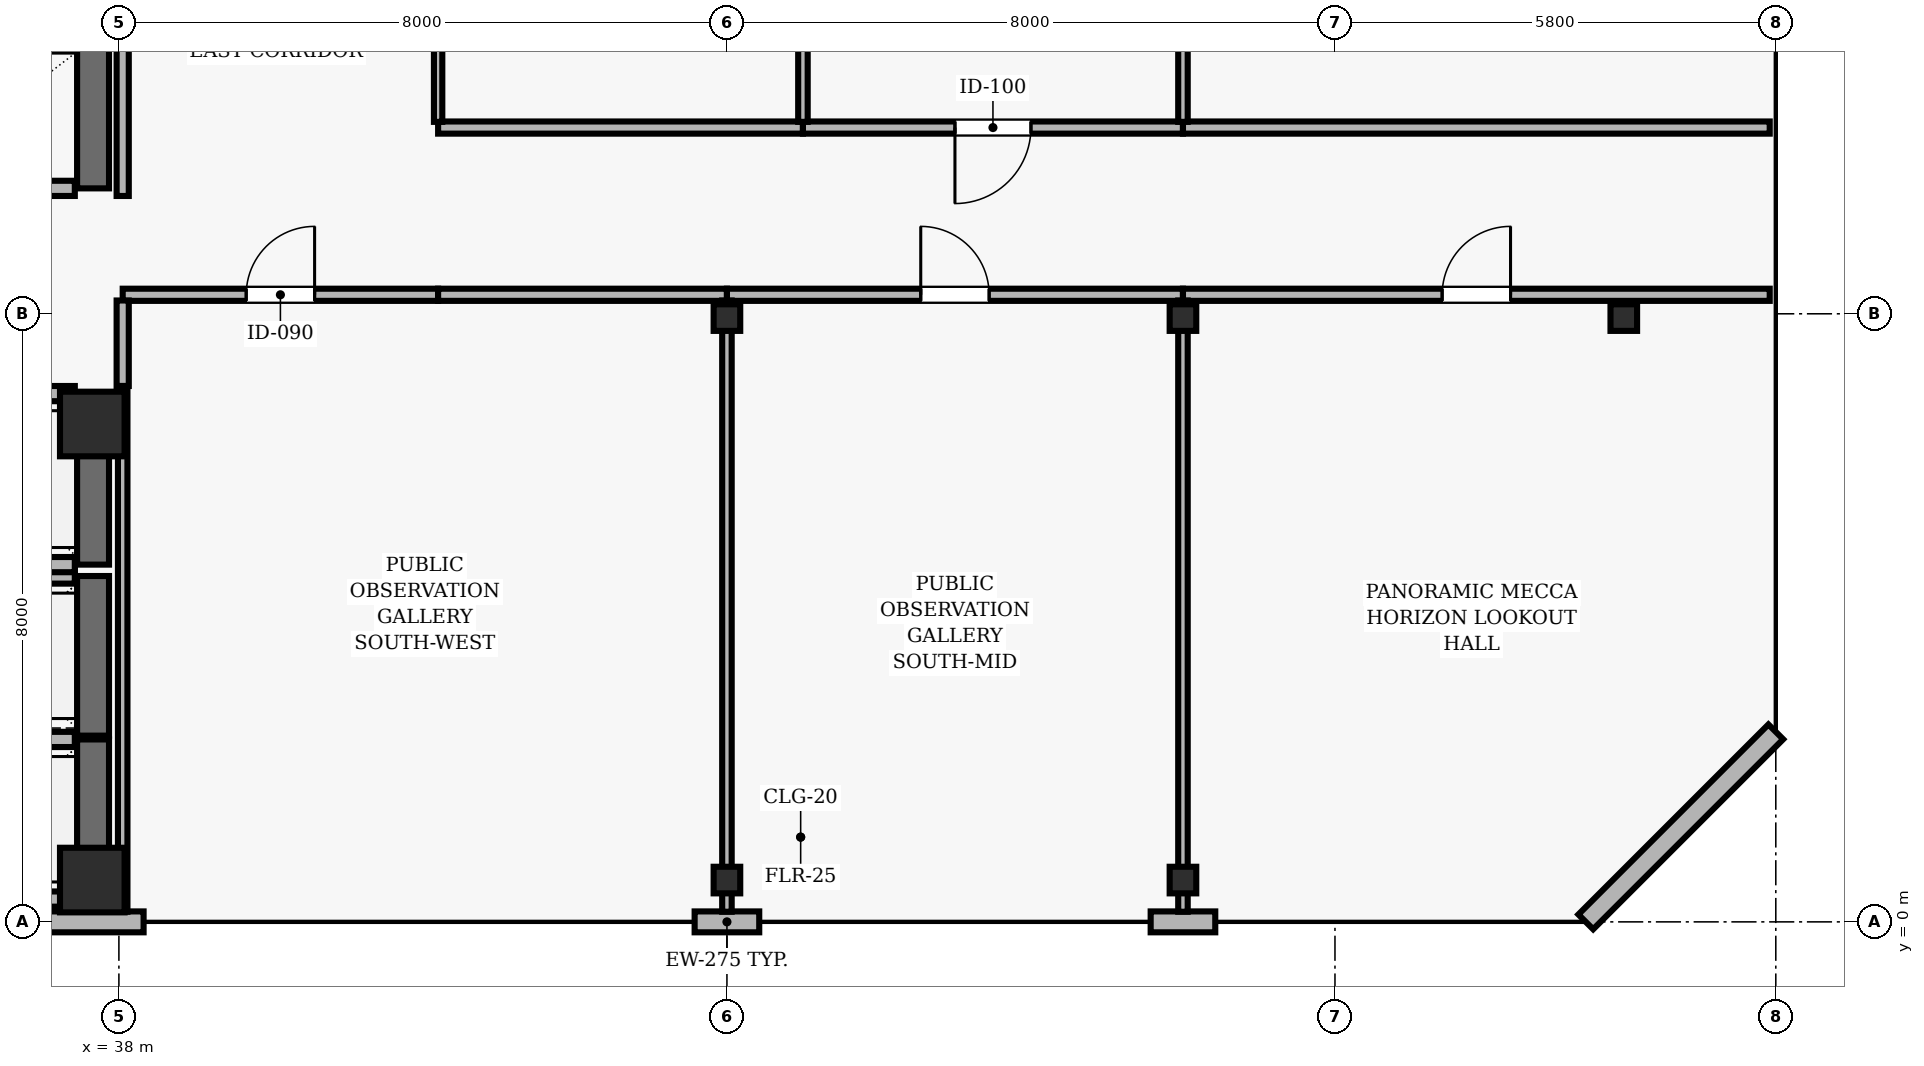
"""IFC4 building model, lengths in metres.
Left out: names, types, materials, properties, quantities, classifications, styles, units other than length and angle.
Written with IfcOpenShell. Run it as: python <this file> out.ifc"""

import sys

from ifc_helpers import new_model, si_unit, direction, frame, frame_2d, origin, origin_2d, place, context, subcontext, project, spatial, rectangle, hollow_rectangle, extrude, element, fill, save


model = new_model("IFC4")
c1 = context("Model", 3, precision=1e-05, world=origin(), true_north=direction((0.0, 1.0)))
c2 = subcontext(c1, "Body", "Model", "MODEL_VIEW")
j1 = project(units=[si_unit("LENGTHUNIT", "METRE"), si_unit("PLANEANGLEUNIT", "RADIAN")], contexts=[c1])
p1 = place(None, origin())
s1 = spatial("IfcSite", under=j1, at=p1, CompositionType="ELEMENT")
p2 = place(p1, origin())
s2 = spatial("IfcBuilding", under=s1, at=p2, CompositionType="ELEMENT")
p3 = place(p2, frame((0.0, 0.0, 306.7)))
s3 = spatial("IfcBuildingStorey", under=s2, at=p3, CompositionType="ELEMENT", Elevation=306.7)
for number, where, z_axis, x_axis in (
    (1, (37.65, 0.55, 0.0), (0.0, 0.0, 1.0), (1.0, 0.0, 0.0)),
    (2, (37.65, 6.55, 0.0), (0.0, 0.0, 1.0), (1.0, 0.0, 0.0)),
):
    element("IfcColumn", number, at=place(p3, frame(where, z_axis=z_axis, x_axis=x_axis)), inside=s3, PredefinedType="COLUMN", context=c2, shape_type="SweptSolid", body=[
        extrude(rectangle(XDim=0.85, YDim=0.85, at=origin_2d()), origin(), (0.0, 0.0, 1.0), 5.0),
    ])
for number, where, z_axis, x_axis in (
    (3, (46.0, 0.55, 0.0), (0.0, 0.0, 1.0), (1.0, 0.0, 0.0)),
    (4, (46.0, 7.95, 0.0), (0.0, 0.0, 1.0), (1.0, 0.0, 0.0)),
    (5, (52.0, 0.55, 0.0), (0.0, 0.0, 1.0), (1.0, 0.0, 0.0)),
    (6, (52.0, 7.95, 0.0), (0.0, 0.0, 1.0), (1.0, 0.0, 0.0)),
    (7, (57.8, 7.95, 0.0), (0.0, 0.0, 1.0), (1.0, 0.0, 0.0)),
):
    element("IfcColumn", number, at=place(p3, frame(where, z_axis=z_axis, x_axis=x_axis)), inside=s3, PredefinedType="COLUMN", context=c2, shape_type="SweptSolid", body=[
        extrude(hollow_rectangle(XDim=0.35, YDim=0.35, WallThickness=0.016, at=origin_2d()), origin(), (0.0, 0.0, 1.0), 5.0),
    ])
p4 = place(p3, frame((36.975, 0.0, 0.0), z_axis=(0.0, 0.0, 1.0), x_axis=(1.0, 0.0, 0.0)))
e8 = element("IfcWall", 8, at=p4, inside=s3, PredefinedType="SOLIDWALL", context=c2, shape_type="SweptSolid", body=[
    extrude(rectangle(XDim=1.35, YDim=0.275, at=frame_2d((0.675, 0.0))), origin(), (0.0, 0.0, 1.0), 4.74),
])
for number, where, z_axis, x_axis in (
    (9, (45.575, 0.0, 0.0), (0.0, 0.0, 1.0), (1.0, 0.0, 0.0)),
    (10, (51.575, 0.0, 0.0), (0.0, 0.0, 1.0), (1.0, 0.0, 0.0)),
):
    element("IfcWall", number, at=place(p3, frame(where, z_axis=z_axis, x_axis=x_axis)), inside=s3, PredefinedType="SOLIDWALL", context=c2, shape_type="SweptSolid", body=[
        extrude(rectangle(XDim=0.85, YDim=0.275, at=frame_2d((0.425, 0.0))), origin(), (0.0, 0.0, 1.0), 4.74),
    ])
p5 = place(p3, frame((57.3, 0.0, 0.0), z_axis=(0.0, 0.0, 1.0), x_axis=(0.707106781187, 0.707106781187, 0.0)))
e11 = element("IfcWall", 11, at=p5, inside=s3, PredefinedType="SOLIDWALL", context=c2, shape_type="SweptSolid", body=[
    extrude(rectangle(XDim=3.536, YDim=0.275, at=frame_2d((1.768, 0.0))), origin(), (0.0, 0.0, 1.0), 4.74),
])
p6 = place(p3, frame((37.66, 0.3, 0.0), z_axis=(0.0, 0.0, 1.0), x_axis=(0.0, 1.0, 0.0)))
e12 = element("IfcWall", 12, at=p6, inside=s3, PredefinedType="SHEAR", context=c2, shape_type="SweptSolid", body=[
    extrude(rectangle(XDim=2.1, YDim=0.42, at=frame_2d((1.05, 0.0))), origin(), (0.0, 0.0, 1.0), 4.74),
])
for number, where, z_axis, x_axis in (
    (13, (35.28, 0.3, 0.0), (0.0, 0.0, 1.0), (1.0, 0.0, 0.0)),
    (14, (37.42, 2.4, 0.0), (0.0, 0.0, 1.0), (-1.0, 0.0, 0.0)),
):
    element("IfcWall", number, at=place(p3, frame(where, z_axis=z_axis, x_axis=x_axis)), inside=s3, PredefinedType="SOLIDWALL", context=c2, shape_type="SweptSolid", body=[
        extrude(rectangle(XDim=2.14, YDim=0.2, at=frame_2d((1.07, 0.0))), origin(), (0.0, 0.0, 1.0), 4.74),
    ])
p7 = place(p3, frame((37.66, 2.45, 0.0), z_axis=(0.0, 0.0, 1.0), x_axis=(0.0, 1.0, 0.0)))
e15 = element("IfcWall", 15, at=p7, inside=s3, PredefinedType="SHEAR", context=c2, shape_type="SweptSolid", body=[
    extrude(rectangle(XDim=2.1, YDim=0.42, at=frame_2d((1.05, 0.0))), origin(), (0.0, 0.0, 1.0), 4.74),
])
p8 = place(p3, frame((37.42, 4.55, 0.0), z_axis=(0.0, 0.0, 1.0), x_axis=(-1.0, 0.0, 0.0)))
e16 = element("IfcWall", 16, at=p8, inside=s3, PredefinedType="SOLIDWALL", context=c2, shape_type="SweptSolid", body=[
    extrude(rectangle(XDim=2.14, YDim=0.2, at=frame_2d((1.07, 0.0))), origin(), (0.0, 0.0, 1.0), 4.74),
])
p9 = place(p3, frame((37.66, 4.7, 0.0), z_axis=(0.0, 0.0, 1.0), x_axis=(0.0, 1.0, 0.0)))
e17 = element("IfcWall", 17, at=p9, inside=s3, PredefinedType="SHEAR", context=c2, shape_type="SweptSolid", body=[
    extrude(rectangle(XDim=2.25, YDim=0.42, at=frame_2d((1.125, 0.0))), origin(), (0.0, 0.0, 1.0), 4.74),
])
for number, where, z_axis, x_axis in (
    (18, (35.28, 4.7, 0.0), (0.0, 0.0, 1.0), (1.0, 0.0, 0.0)),
    (19, (37.42, 6.95, 0.0), (0.0, 0.0, 1.0), (-1.0, 0.0, 0.0)),
):
    element("IfcWall", number, at=place(p3, frame(where, z_axis=z_axis, x_axis=x_axis)), inside=s3, PredefinedType="SOLIDWALL", context=c2, shape_type="SweptSolid", body=[
        extrude(rectangle(XDim=2.14, YDim=0.2, at=frame_2d((1.07, 0.0))), origin(), (0.0, 0.0, 1.0), 4.74),
    ])
p10 = place(p3, frame((37.66, 9.65, 0.0), z_axis=(0.0, 0.0, 1.0), x_axis=(0.0, 1.0, 0.0)))
e20 = element("IfcWall", 20, at=p10, inside=s3, PredefinedType="SHEAR", context=c2, shape_type="SweptSolid", body=[
    extrude(rectangle(XDim=1.9, YDim=0.42, at=frame_2d((0.95, 0.0))), origin(), (0.0, 0.0, 1.0), 4.74),
])
p11 = place(p3, frame((35.28, 9.65, 0.0), z_axis=(0.0, 0.0, 1.0), x_axis=(1.0, 0.0, 0.0)))
e21 = element("IfcWall", 21, at=p11, inside=s3, PredefinedType="SOLIDWALL", context=c2, shape_type="SweptSolid", body=[
    extrude(rectangle(XDim=2.14, YDim=0.2, at=frame_2d((1.07, 0.0))), origin(), (0.0, 0.0, 1.0), 4.74),
])
p12 = place(p3, frame((38.05, 8.25, 0.0), z_axis=(0.0, 0.0, 1.0), x_axis=(1.0, 0.0, 0.0)))
e22 = element("IfcWall", 22, at=p12, inside=s3, PredefinedType="PARTITIONING", context=c2, shape_type="SweptSolid", body=[
    extrude(rectangle(XDim=4.15, YDim=0.16, at=frame_2d((2.075, 0.0))), origin(), (0.0, 0.0, 1.0), 4.277),
])
p13 = place(p12, frame((1.625, 0.0, 0.0)))
e23 = element("IfcOpeningElement", 23, at=p13, cuts=e22, PredefinedType="OPENING", context=c2, shape_type="SweptSolid", body=[
    extrude(rectangle(XDim=0.9, YDim=2.1, at=frame_2d((0.45, 1.05))), frame((0.0, 0.09, 0.0), z_axis=(0.0, -1.0, 0.0), x_axis=(1.0, 0.0, 0.0)), (0.0, 0.0, 1.0), 0.18),
])
p14 = place(p3, frame((42.2, 8.25, 0.0), z_axis=(0.0, 0.0, 1.0), x_axis=(1.0, 0.0, 0.0)))
e24 = element("IfcWall", 24, at=p14, inside=s3, PredefinedType="PARTITIONING", context=c2, shape_type="SweptSolid", body=[
    extrude(rectangle(XDim=3.8, YDim=0.16, at=frame_2d((1.9, 0.0))), origin(), (0.0, 0.0, 1.0), 4.277),
])
p15 = place(p3, frame((46.0, 8.25, 0.0), z_axis=(0.0, 0.0, 1.0), x_axis=(1.0, 0.0, 0.0)))
e25 = element("IfcWall", 25, at=p15, inside=s3, PredefinedType="PARTITIONING", context=c2, shape_type="SweptSolid", body=[
    extrude(rectangle(XDim=6.0, YDim=0.16, at=frame_2d((3.0, 0.0))), origin(), (0.0, 0.0, 1.0), 4.277),
])
p16 = place(p15, frame((2.55, 0.0, 0.0)))
e26 = element("IfcOpeningElement", 26, at=p16, cuts=e25, PredefinedType="OPENING", context=c2, shape_type="SweptSolid", body=[
    extrude(rectangle(XDim=0.9, YDim=2.1, at=frame_2d((0.45, 1.05))), frame((0.0, 0.09, 0.0), z_axis=(0.0, -1.0, 0.0), x_axis=(1.0, 0.0, 0.0)), (0.0, 0.0, 1.0), 0.18),
])
p17 = place(p3, frame((47.0, 10.45, 0.0), z_axis=(0.0, 0.0, 1.0), x_axis=(-1.0, 0.0, 0.0)))
e27 = element("IfcWall", 27, at=p17, inside=s3, PredefinedType="PARTITIONING", context=c2, shape_type="SweptSolid", body=[
    extrude(rectangle(XDim=4.8, YDim=0.16, at=frame_2d((2.4, 0.0))), origin(), (0.0, 0.0, 1.0), 4.474),
])
p18 = place(p3, frame((52.0, 8.25, 0.0), z_axis=(0.0, 0.0, 1.0), x_axis=(1.0, 0.0, 0.0)))
e28 = element("IfcWall", 28, at=p18, inside=s3, PredefinedType="PARTITIONING", context=c2, shape_type="SweptSolid", body=[
    extrude(rectangle(XDim=7.72, YDim=0.16, at=frame_2d((3.86, 0.0))), origin(), (0.0, 0.0, 1.0), 4.277),
])
p19 = place(p18, frame((3.41, 0.0, 0.0)))
e29 = element("IfcOpeningElement", 29, at=p19, cuts=e28, PredefinedType="OPENING", context=c2, shape_type="SweptSolid", body=[
    extrude(rectangle(XDim=0.9, YDim=2.1, at=frame_2d((0.45, 1.05))), frame((0.0, 0.09, 0.0), z_axis=(0.0, -1.0, 0.0), x_axis=(1.0, 0.0, 0.0)), (0.0, 0.0, 1.0), 0.18),
])
p20 = place(p3, frame((52.0, 10.45, 0.0), z_axis=(0.0, 0.0, 1.0), x_axis=(-1.0, 0.0, 0.0)))
e30 = element("IfcWall", 30, at=p20, inside=s3, PredefinedType="PARTITIONING", context=c2, shape_type="SweptSolid", body=[
    extrude(rectangle(XDim=5.0, YDim=0.16, at=frame_2d((2.5, 0.0))), origin(), (0.0, 0.0, 1.0), 4.474),
])
p21 = place(p20, frame((2.0, 0.0, 0.0)))
e31 = element("IfcOpeningElement", 31, at=p21, cuts=e30, PredefinedType="OPENING", context=c2, shape_type="SweptSolid", body=[
    extrude(rectangle(XDim=1.0, YDim=2.1, at=frame_2d((0.5, 1.05))), frame((0.0, 0.09, 0.0), z_axis=(0.0, -1.0, 0.0), x_axis=(1.0, 0.0, 0.0)), (0.0, 0.0, 1.0), 0.18),
])
p22 = place(p3, frame((59.72, 10.45, 0.0), z_axis=(0.0, 0.0, 1.0), x_axis=(-1.0, 0.0, 0.0)))
e32 = element("IfcWall", 32, at=p22, inside=s3, PredefinedType="PARTITIONING", context=c2, shape_type="SweptSolid", body=[
    extrude(rectangle(XDim=7.72, YDim=0.16, at=frame_2d((3.86, 0.0))), origin(), (0.0, 0.0, 1.0), 4.474),
])
p23 = place(p3, frame((38.05, 7.05, 0.0), z_axis=(0.0, 0.0, 1.0), x_axis=(0.0, 1.0, 0.0)))
e33 = element("IfcWall", 33, at=p23, inside=s3, PredefinedType="PARTITIONING", context=c2, shape_type="SweptSolid", body=[
    extrude(rectangle(XDim=1.125, YDim=0.16, at=frame_2d((0.562, 0.0))), origin(), (0.0, 0.0, 1.0), 4.277),
])
p24 = place(p3, frame((38.05, 7.05, 0.0), z_axis=(0.0, 0.0, 1.0), x_axis=(0.0, -1.0, 0.0)))
e34 = element("IfcWall", 34, at=p24, inside=s3, PredefinedType="PARTITIONING", context=c2, shape_type="SweptSolid", body=[
    extrude(rectangle(XDim=6.917, YDim=0.125, at=frame_2d((3.458, 0.0))), origin(), (0.0, 0.0, 1.0), 4.277),
])
p25 = place(p3, frame((38.05, 15.925, 0.0), z_axis=(0.0, 0.0, 1.0), x_axis=(0.0, -1.0, 0.0)))
e35 = element("IfcWall", 35, at=p25, inside=s3, PredefinedType="PARTITIONING", context=c2, shape_type="SweptSolid", body=[
    extrude(rectangle(XDim=6.375, YDim=0.16, at=frame_2d((3.188, 0.0))), origin(), (0.0, 0.0, 1.0), 4.277),
])
p26 = place(p3, frame((42.2, 10.525, 0.0), z_axis=(0.0, 0.0, 1.0), x_axis=(0.0, 1.0, 0.0)))
e36 = element("IfcWall", 36, at=p26, inside=s3, PredefinedType="MOVABLE", context=c2, shape_type="SweptSolid", body=[
    extrude(rectangle(XDim=5.4, YDim=0.11, at=frame_2d((2.7, 0.0))), origin(), (0.0, 0.0, 1.0), 4.74),
])
p27 = place(p26, frame((2.25, 0.0, 0.0)))
e37 = element("IfcOpeningElement", 37, at=p27, cuts=e36, PredefinedType="OPENING", context=c2, shape_type="SweptSolid", body=[
    extrude(rectangle(XDim=0.9, YDim=2.1, at=frame_2d((0.45, 1.05))), frame((0.0, 0.065, 0.0), z_axis=(0.0, -1.0, 0.0), x_axis=(1.0, 0.0, 0.0)), (0.0, 0.0, 1.0), 0.13),
])
p28 = place(p3, frame((46.0, 0.133, 0.0), z_axis=(0.0, 0.0, 1.0), x_axis=(0.0, 1.0, 0.0)))
e38 = element("IfcWall", 38, at=p28, inside=s3, PredefinedType="PARTITIONING", context=c2, shape_type="SweptSolid", body=[
    extrude(rectangle(XDim=8.042, YDim=0.125, at=frame_2d((4.021, 0.0))), origin(), (0.0, 0.0, 1.0), 4.277),
])
p29 = place(p3, frame((47.0, 10.525, 0.0), z_axis=(0.0, 0.0, 1.0), x_axis=(0.0, 1.0, 0.0)))
e39 = element("IfcWall", 39, at=p29, inside=s3, PredefinedType="PARTITIONING", context=c2, shape_type="SweptSolid", body=[
    extrude(rectangle(XDim=5.342, YDim=0.125, at=frame_2d((2.671, 0.0))), origin(), (0.0, 0.0, 1.0), 4.74),
])
p30 = place(p3, frame((52.0, 0.133, 0.0), z_axis=(0.0, 0.0, 1.0), x_axis=(0.0, 1.0, 0.0)))
e40 = element("IfcWall", 40, at=p30, inside=s3, PredefinedType="PARTITIONING", context=c2, shape_type="SweptSolid", body=[
    extrude(rectangle(XDim=8.042, YDim=0.125, at=frame_2d((4.021, 0.0))), origin(), (0.0, 0.0, 1.0), 4.277),
])
p31 = place(p3, frame((52.0, 10.525, 0.0), z_axis=(0.0, 0.0, 1.0), x_axis=(0.0, 1.0, 0.0)))
e41 = element("IfcWall", 41, at=p31, inside=s3, PredefinedType="PARTITIONING", context=c2, shape_type="SweptSolid", body=[
    extrude(rectangle(XDim=5.342, YDim=0.125, at=frame_2d((2.671, 0.0))), origin(), (0.0, 0.0, 1.0), 4.277),
])
p32 = place(p13, origin())
e42 = element("IfcDoor", 42, at=p32, inside=s3, OperationType="SINGLE_SWING_RIGHT", PredefinedType="DOOR", context=c2, shape_type="SweptSolid", body=[
    extrude(rectangle(XDim=0.9, YDim=2.1, at=frame_2d((0.45, 1.05))), frame((0.0, 0.025, 0.0), z_axis=(0.0, -1.0, 0.0), x_axis=(1.0, 0.0, 0.0)), (0.0, 0.0, 1.0), 0.05),
])
fill(e23, e42)
p33 = place(p16, origin())
e43 = element("IfcDoor", 43, at=p33, inside=s3, OperationType="SINGLE_SWING_LEFT", PredefinedType="DOOR", context=c2, shape_type="SweptSolid", body=[
    extrude(rectangle(XDim=0.9, YDim=2.1, at=frame_2d((0.45, 1.05))), frame((0.0, 0.025, 0.0), z_axis=(0.0, -1.0, 0.0), x_axis=(1.0, 0.0, 0.0)), (0.0, 0.0, 1.0), 0.05),
])
fill(e26, e43)
p34 = place(p19, origin())
e44 = element("IfcDoor", 44, at=p34, inside=s3, OperationType="SINGLE_SWING_RIGHT", PredefinedType="DOOR", context=c2, shape_type="SweptSolid", body=[
    extrude(rectangle(XDim=0.9, YDim=2.1, at=frame_2d((0.45, 1.05))), frame((0.0, 0.025, 0.0), z_axis=(0.0, -1.0, 0.0), x_axis=(1.0, 0.0, 0.0)), (0.0, 0.0, 1.0), 0.05),
])
fill(e29, e44)
p35 = place(p21, origin())
e45 = element("IfcDoor", 45, at=p35, inside=s3, OperationType="SINGLE_SWING_RIGHT", PredefinedType="DOOR", context=c2, shape_type="SweptSolid", body=[
    extrude(rectangle(XDim=1.0, YDim=2.1, at=frame_2d((0.5, 1.05))), frame((0.0, 0.025, 0.0), z_axis=(0.0, -1.0, 0.0), x_axis=(1.0, 0.0, 0.0)), (0.0, 0.0, 1.0), 0.05),
])
fill(e31, e45)
save(model, sys.argv[1])
